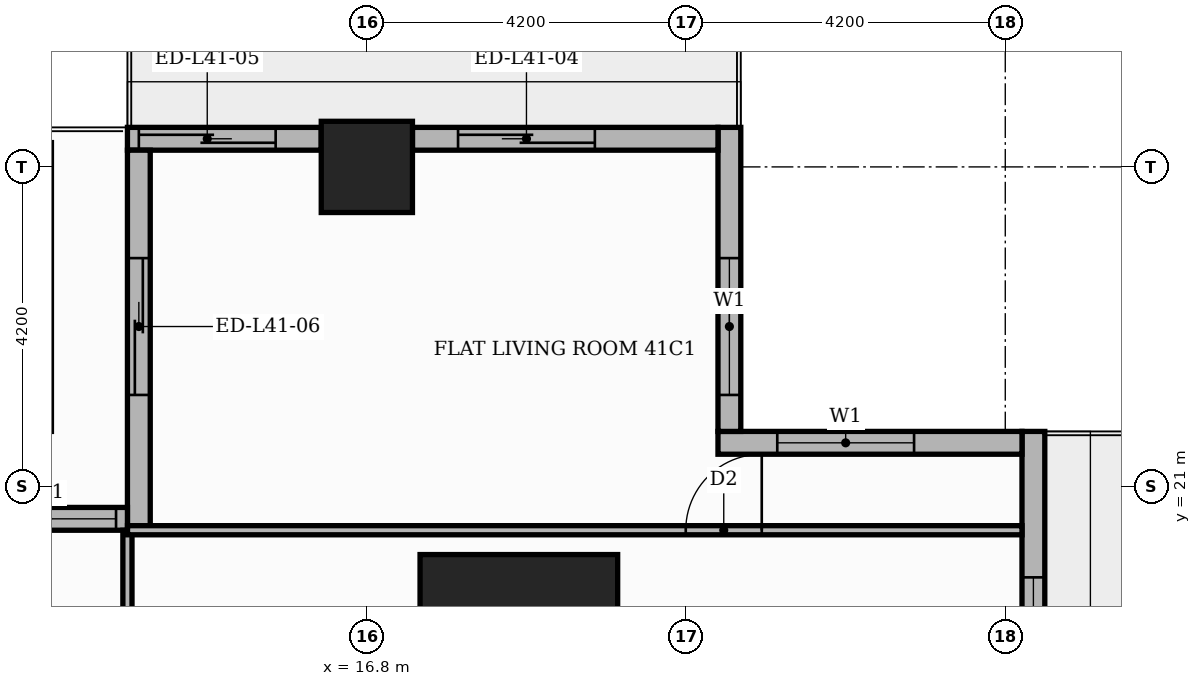
"""IFC4 building model, lengths in metres.
Left out: names, types, materials, properties, quantities, classifications, styles, units other than length and angle.
Written with IfcOpenShell. Run it as: python <this file> out.ifc"""

import sys

from ifc_helpers import new_model, si_unit, direction, frame, frame_2d, origin, origin_2d, place, context, subcontext, project, spatial, rectangle, extrude, element, fill, save


model = new_model("IFC4")
c1 = context("Model", 3, precision=1e-05, world=origin(), true_north=direction((0.0, 1.0)))
c2 = subcontext(c1, "Body", "Model", "MODEL_VIEW")
j1 = project(units=[si_unit("LENGTHUNIT", "METRE"), si_unit("PLANEANGLEUNIT", "RADIAN")], contexts=[c1])
p1 = place(None, origin())
s1 = spatial("IfcSite", under=j1, at=p1, CompositionType="ELEMENT")
p2 = place(p1, origin())
s2 = spatial("IfcBuilding", under=s1, at=p2, CompositionType="ELEMENT")
p3 = place(p2, frame((0.0, 0.0, 172.8)))
s3 = spatial("IfcBuildingStorey", under=s2, at=p3, CompositionType="ELEMENT", Elevation=172.8)
p4 = place(p3, frame((18.8, 18.8, 0.0), z_axis=(0.0, 0.0, 1.0), x_axis=(1.0, 0.0, 0.0)))
e1 = element("IfcColumn", 1, at=p4, inside=s3, PredefinedType="COLUMN", context=c2, shape_type="SweptSolid", body=[
    extrude(rectangle(XDim=2.6, YDim=2.6, at=origin_2d()), origin(), (0.0, 0.0, 1.0), 3.9),
])
p5 = place(p3, frame((16.8, 25.2, 0.0), z_axis=(0.0, 0.0, 1.0), x_axis=(1.0, 0.0, 0.0)))
e2 = element("IfcColumn", 2, at=p5, inside=s3, PredefinedType="COLUMN", context=c2, shape_type="SweptSolid", body=[
    extrude(rectangle(XDim=1.2, YDim=1.2, at=origin_2d()), origin(), (0.0, 0.0, 1.0), 3.9),
])
p6 = place(p3, frame((25.57, 17.4, 0.0), z_axis=(0.0, 0.0, 1.0), x_axis=(0.0, 1.0, 0.0)))
e3 = element("IfcWall", 3, at=p6, inside=s3, PredefinedType="STANDARD", context=c2, shape_type="SweptSolid", body=[
    extrude(rectangle(XDim=4.32, YDim=0.3, at=frame_2d((2.16, 0.0))), origin(), (0.0, 0.0, 1.0), 3.48),
])
p7 = place(p6, frame((0.6, 0.0, 0.9)))
e4 = element("IfcOpeningElement", 4, at=p7, cuts=e3, PredefinedType="OPENING", context=c2, shape_type="SweptSolid", body=[
    extrude(rectangle(XDim=1.8, YDim=2.1, at=frame_2d((0.9, 1.05))), frame((0.0, 0.16, 0.0), z_axis=(0.0, -1.0, 0.0), x_axis=(1.0, 0.0, 0.0)), (0.0, 0.0, 1.0), 0.32),
])
p8 = place(p3, frame((25.42, 21.57, 0.0), z_axis=(0.0, 0.0, 1.0), x_axis=(-1.0, 0.0, 0.0)))
e5 = element("IfcWall", 5, at=p8, inside=s3, PredefinedType="STANDARD", context=c2, shape_type="SweptSolid", body=[
    extrude(rectangle(XDim=4.0, YDim=0.3, at=frame_2d((2.0, 0.0))), origin(), (0.0, 0.0, 1.0), 3.48),
])
p9 = place(p8, frame((1.42, 0.0, 0.9)))
e6 = element("IfcOpeningElement", 6, at=p9, cuts=e5, PredefinedType="OPENING", context=c2, shape_type="SweptSolid", body=[
    extrude(rectangle(XDim=1.8, YDim=2.1, at=frame_2d((0.9, 1.05))), frame((0.0, 0.16, 0.0), z_axis=(0.0, -1.0, 0.0), x_axis=(1.0, 0.0, 0.0)), (0.0, 0.0, 1.0), 0.32),
])
p10 = place(p3, frame((21.57, 21.72, 0.0), z_axis=(0.0, 0.0, 1.0), x_axis=(0.0, 1.0, 0.0)))
e7 = element("IfcWall", 7, at=p10, inside=s3, PredefinedType="STANDARD", context=c2, shape_type="SweptSolid", body=[
    extrude(rectangle(XDim=4.0, YDim=0.3, at=frame_2d((2.0, 0.0))), origin(), (0.0, 0.0, 1.0), 3.48),
])
p11 = place(p10, frame((0.48, 0.0, 0.9)))
e8 = element("IfcOpeningElement", 8, at=p11, cuts=e7, PredefinedType="OPENING", context=c2, shape_type="SweptSolid", body=[
    extrude(rectangle(XDim=1.8, YDim=2.1, at=frame_2d((0.9, 1.05))), frame((0.0, 0.16, 0.0), z_axis=(0.0, -1.0, 0.0), x_axis=(1.0, 0.0, 0.0)), (0.0, 0.0, 1.0), 0.32),
])
p12 = place(p3, frame((21.42, 25.57, 0.0), z_axis=(0.0, 0.0, 1.0), x_axis=(-1.0, 0.0, 0.0)))
e9 = element("IfcWall", 9, at=p12, inside=s3, PredefinedType="STANDARD", context=c2, shape_type="SweptSolid", body=[
    extrude(rectangle(XDim=4.02, YDim=0.3, at=frame_2d((2.01, 0.0))), origin(), (0.0, 0.0, 1.0), 3.48),
])
p13 = place(p12, frame((1.62, 0.0, 0.0)))
e10 = element("IfcOpeningElement", 10, at=p13, cuts=e9, PredefinedType="OPENING", context=c2, shape_type="SweptSolid", body=[
    extrude(rectangle(XDim=1.8, YDim=2.4, at=frame_2d((0.9, 1.2))), frame((0.0, 0.16, 0.0), z_axis=(0.0, -1.0, 0.0), x_axis=(1.0, 0.0, 0.0)), (0.0, 0.0, 1.0), 0.32),
])
p14 = place(p3, frame((16.2, 25.57, 0.0), z_axis=(0.0, 0.0, 1.0), x_axis=(-1.0, 0.0, 0.0)))
e11 = element("IfcWall", 11, at=p14, inside=s3, PredefinedType="STANDARD", context=c2, shape_type="SweptSolid", body=[
    extrude(rectangle(XDim=2.55, YDim=0.3, at=frame_2d((1.275, 0.0))), origin(), (0.0, 0.0, 1.0), 3.48),
])
p15 = place(p14, frame((0.6, 0.0, 0.0)))
e12 = element("IfcOpeningElement", 12, at=p15, cuts=e11, PredefinedType="OPENING", context=c2, shape_type="SweptSolid", body=[
    extrude(rectangle(XDim=1.8, YDim=2.4, at=frame_2d((0.9, 1.2))), frame((0.0, 0.16, 0.0), z_axis=(0.0, -1.0, 0.0), x_axis=(1.0, 0.0, 0.0)), (0.0, 0.0, 1.0), 0.32),
])
p16 = place(p3, frame((13.8, 25.42, 0.0), z_axis=(0.0, 0.0, 1.0), x_axis=(0.0, -1.0, 0.0)))
e13 = element("IfcWall", 13, at=p16, inside=s3, PredefinedType="STANDARD", context=c2, shape_type="SweptSolid", body=[
    extrude(rectangle(XDim=5.0, YDim=0.3, at=frame_2d((2.5, 0.0))), origin(), (0.0, 0.0, 1.0), 3.48),
])
p17 = place(p16, frame((1.42, 0.0, 0.0)))
e14 = element("IfcOpeningElement", 14, at=p17, cuts=e13, PredefinedType="OPENING", context=c2, shape_type="SweptSolid", body=[
    extrude(rectangle(XDim=1.8, YDim=2.4, at=frame_2d((0.9, 1.2))), frame((0.0, 0.16, 0.0), z_axis=(0.0, -1.0, 0.0), x_axis=(1.0, 0.0, 0.0)), (0.0, 0.0, 1.0), 0.32),
])
p18 = place(p3, frame((13.65, 20.57, 0.0), z_axis=(0.0, 0.0, 1.0), x_axis=(-1.0, 0.0, 0.0)))
e15 = element("IfcWall", 15, at=p18, inside=s3, PredefinedType="STANDARD", context=c2, shape_type="SweptSolid", body=[
    extrude(rectangle(XDim=27.6, YDim=0.3, at=frame_2d((13.8, 0.0))), origin(), (0.0, 0.0, 1.0), 3.48),
])
p19 = place(p18, frame((0.15, 0.0, 0.9)))
e16 = element("IfcOpeningElement", 16, at=p19, cuts=e15, PredefinedType="OPENING", context=c2, shape_type="SweptSolid", body=[
    extrude(rectangle(XDim=1.8, YDim=2.1, at=frame_2d((0.9, 1.05))), frame((0.0, 0.16, 0.0), z_axis=(0.0, -1.0, 0.0), x_axis=(1.0, 0.0, 0.0)), (0.0, 0.0, 1.0), 0.32),
])
p20 = place(p18, frame((2.25, 0.0, 0.9)))
e17 = element("IfcOpeningElement", 17, at=p20, cuts=e15, PredefinedType="OPENING", context=c2, shape_type="SweptSolid", body=[
    extrude(rectangle(XDim=6.0, YDim=2.1, at=frame_2d((3.0, 1.05))), frame((0.0, 0.16, 0.0), z_axis=(0.0, -1.0, 0.0), x_axis=(1.0, 0.0, 0.0)), (0.0, 0.0, 1.0), 0.32),
])
p21 = place(p18, frame((8.55, 0.0, 0.9)))
e18 = element("IfcOpeningElement", 18, at=p21, cuts=e15, PredefinedType="OPENING", context=c2, shape_type="SweptSolid", body=[
    extrude(rectangle(XDim=6.0, YDim=2.1, at=frame_2d((3.0, 1.05))), frame((0.0, 0.16, 0.0), z_axis=(0.0, -1.0, 0.0), x_axis=(1.0, 0.0, 0.0)), (0.0, 0.0, 1.0), 0.32),
])
p22 = place(p18, frame((14.85, 0.0, 0.9)))
e19 = element("IfcOpeningElement", 19, at=p22, cuts=e15, PredefinedType="OPENING", context=c2, shape_type="SweptSolid", body=[
    extrude(rectangle(XDim=6.0, YDim=2.1, at=frame_2d((3.0, 1.05))), frame((0.0, 0.16, 0.0), z_axis=(0.0, -1.0, 0.0), x_axis=(1.0, 0.0, 0.0)), (0.0, 0.0, 1.0), 0.32),
])
p23 = place(p18, frame((21.15, 0.0, 0.9)))
e20 = element("IfcOpeningElement", 20, at=p23, cuts=e15, PredefinedType="OPENING", context=c2, shape_type="SweptSolid", body=[
    extrude(rectangle(XDim=6.0, YDim=2.1, at=frame_2d((3.0, 1.05))), frame((0.0, 0.16, 0.0), z_axis=(0.0, -1.0, 0.0), x_axis=(1.0, 0.0, 0.0)), (0.0, 0.0, 1.0), 0.32),
])
p24 = place(p3, frame((13.65, 13.75, 0.0), z_axis=(0.0, 0.0, 1.0), x_axis=(0.0, 1.0, 0.0)))
e21 = element("IfcWall", 21, at=p24, inside=s3, PredefinedType="PARTITIONING", context=c2, shape_type="SweptSolid", body=[
    extrude(rectangle(XDim=6.669, YDim=0.12, at=frame_2d((3.334, 0.0))), origin(), (0.0, 0.0, 1.0), 3.48),
])
p25 = place(p24, frame((2.834, 0.0, 0.0)))
e22 = element("IfcOpeningElement", 22, at=p25, cuts=e21, PredefinedType="OPENING", context=c2, shape_type="SweptSolid", body=[
    extrude(rectangle(XDim=0.9, YDim=2.1, at=frame_2d((0.45, 1.05))), frame((0.0, 0.07, 0.0), z_axis=(0.0, -1.0, 0.0), x_axis=(1.0, 0.0, 0.0)), (0.0, 0.0, 1.0), 0.14),
])
p26 = place(p3, frame((13.651, 20.42, 0.0), z_axis=(0.0, 0.0, 1.0), x_axis=(1.0, 0.0, 0.0)))
e23 = element("IfcWall", 23, at=p26, inside=s3, PredefinedType="PARTITIONING", context=c2, shape_type="SweptSolid", body=[
    extrude(rectangle(XDim=11.769, YDim=0.12, at=frame_2d((5.885, 0.0))), origin(), (0.0, 0.0, 1.0), 3.48),
])
p27 = place(p26, frame((7.345, 0.0, 0.0)))
e24 = element("IfcOpeningElement", 24, at=p27, cuts=e23, PredefinedType="OPENING", context=c2, shape_type="SweptSolid", body=[
    extrude(rectangle(XDim=1.0, YDim=2.1, at=frame_2d((0.5, 1.05))), frame((0.0, 0.07, 0.0), z_axis=(0.0, -1.0, 0.0), x_axis=(1.0, 0.0, 0.0)), (0.0, 0.0, 1.0), 0.14),
])
p28 = place(p7, origin())
e25 = element("IfcWindow", 25, at=p28, inside=s3, PartitioningType="SINGLE_PANEL", PredefinedType="WINDOW", context=c2, shape_type="SweptSolid", body=[
    extrude(rectangle(XDim=1.8, YDim=2.1, at=frame_2d((0.9, 1.05))), frame((0.0, 0.03, 0.0), z_axis=(0.0, -1.0, 0.0), x_axis=(1.0, 0.0, 0.0)), (0.0, 0.0, 1.0), 0.06),
])
fill(e4, e25)
p29 = place(p9, origin())
e26 = element("IfcWindow", 26, at=p29, inside=s3, PartitioningType="SINGLE_PANEL", PredefinedType="WINDOW", context=c2, shape_type="SweptSolid", body=[
    extrude(rectangle(XDim=1.8, YDim=2.1, at=frame_2d((0.9, 1.05))), frame((0.0, 0.03, 0.0), z_axis=(0.0, -1.0, 0.0), x_axis=(1.0, 0.0, 0.0)), (0.0, 0.0, 1.0), 0.06),
])
fill(e6, e26)
p30 = place(p11, origin())
e27 = element("IfcWindow", 27, at=p30, inside=s3, PartitioningType="SINGLE_PANEL", PredefinedType="WINDOW", context=c2, shape_type="SweptSolid", body=[
    extrude(rectangle(XDim=1.8, YDim=2.1, at=frame_2d((0.9, 1.05))), frame((0.0, 0.03, 0.0), z_axis=(0.0, -1.0, 0.0), x_axis=(1.0, 0.0, 0.0)), (0.0, 0.0, 1.0), 0.06),
])
fill(e8, e27)
p31 = place(p13, origin())
e28 = element("IfcDoor", 28, at=p31, inside=s3, OperationType="SLIDING_TO_RIGHT", PredefinedType="DOOR", context=c2, shape_type="SweptSolid", body=[
    extrude(rectangle(XDim=1.8, YDim=2.4, at=frame_2d((0.9, 1.2))), frame((0.0, 0.025, 0.0), z_axis=(0.0, -1.0, 0.0), x_axis=(1.0, 0.0, 0.0)), (0.0, 0.0, 1.0), 0.05),
])
fill(e10, e28)
p32 = place(p15, origin())
e29 = element("IfcDoor", 29, at=p32, inside=s3, OperationType="SLIDING_TO_LEFT", PredefinedType="DOOR", context=c2, shape_type="SweptSolid", body=[
    extrude(rectangle(XDim=1.8, YDim=2.4, at=frame_2d((0.9, 1.2))), frame((0.0, 0.025, 0.0), z_axis=(0.0, -1.0, 0.0), x_axis=(1.0, 0.0, 0.0)), (0.0, 0.0, 1.0), 0.05),
])
fill(e12, e29)
p33 = place(p17, origin())
e30 = element("IfcDoor", 30, at=p33, inside=s3, OperationType="SLIDING_TO_LEFT", PredefinedType="DOOR", context=c2, shape_type="SweptSolid", body=[
    extrude(rectangle(XDim=1.8, YDim=2.4, at=frame_2d((0.9, 1.2))), frame((0.0, 0.025, 0.0), z_axis=(0.0, -1.0, 0.0), x_axis=(1.0, 0.0, 0.0)), (0.0, 0.0, 1.0), 0.05),
])
fill(e14, e30)
p34 = place(p19, origin())
e31 = element("IfcWindow", 31, at=p34, inside=s3, PartitioningType="SINGLE_PANEL", PredefinedType="WINDOW", context=c2, shape_type="SweptSolid", body=[
    extrude(rectangle(XDim=1.8, YDim=2.1, at=frame_2d((0.9, 1.05))), frame((0.0, 0.03, 0.0), z_axis=(0.0, -1.0, 0.0), x_axis=(1.0, 0.0, 0.0)), (0.0, 0.0, 1.0), 0.06),
])
fill(e16, e31)
p35 = place(p27, origin())
e32 = element("IfcDoor", 32, at=p35, inside=s3, OperationType="SINGLE_SWING_RIGHT", PredefinedType="DOOR", context=c2, shape_type="SweptSolid", body=[
    extrude(rectangle(XDim=1.0, YDim=2.1, at=frame_2d((0.5, 1.05))), frame((0.0, 0.025, 0.0), z_axis=(0.0, -1.0, 0.0), x_axis=(1.0, 0.0, 0.0)), (0.0, 0.0, 1.0), 0.05),
])
fill(e24, e32)
save(model, sys.argv[1])
